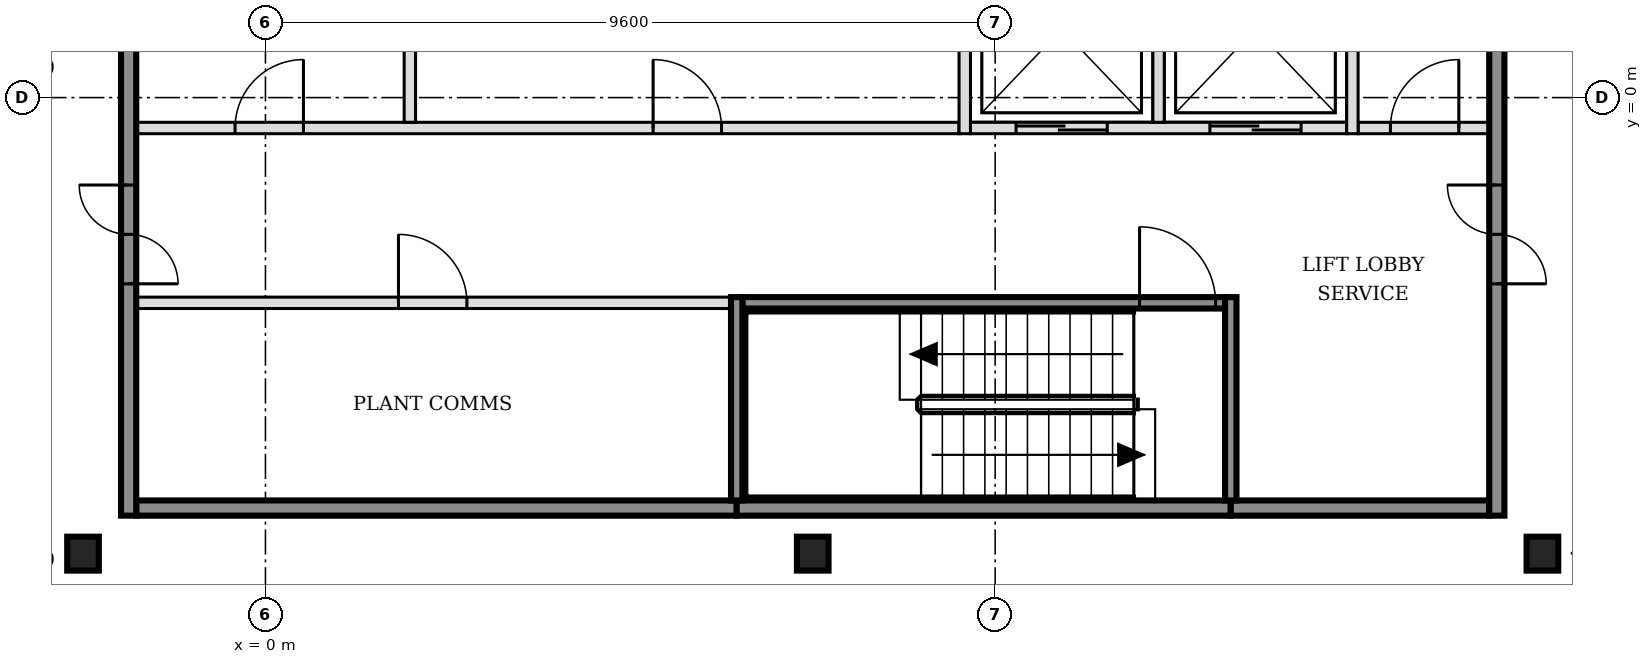
"""IFC4 building model, lengths in metres.
Left out: names, types, materials, properties, quantities, classifications, styles, units other than length and angle.
Written with IfcOpenShell. Run it as: python <this file> out.ifc"""

import sys

from ifc_helpers import new_model, si_unit, direction, frame, frame_2d, origin, origin_2d, place, context, subcontext, project, spatial, rectangle, i_section, extrude, element, fill, save


model = new_model("IFC4")
c1 = context("Model", 3, precision=1e-05, world=origin(), true_north=direction((0.0, 1.0)))
c2 = subcontext(c1, "Body", "Model", "MODEL_VIEW")
j1 = project(units=[si_unit("LENGTHUNIT", "METRE"), si_unit("PLANEANGLEUNIT", "RADIAN")], contexts=[c1])
p1 = place(None, origin())
s1 = spatial("IfcSite", under=j1, at=p1, CompositionType="ELEMENT")
p2 = place(p1, origin())
s2 = spatial("IfcBuilding", under=s1, at=p2, CompositionType="ELEMENT")
p3 = place(p2, frame((0.0, 0.0, 168.6)))
s3 = spatial("IfcBuildingStorey", under=s2, at=p3, CompositionType="ELEMENT", Elevation=168.6)
for number, where, z_axis, x_axis in (
    (1, (-2.4, -6.0, -0.15), (0.0, 0.0, 1.0), (1.0, 0.0, 0.0)),
    (2, (7.2, -6.0, -0.15), (0.0, 0.0, 1.0), (1.0, 0.0, 0.0)),
    (3, (16.8, -6.0, -0.15), (0.0, 0.0, 1.0), (1.0, 0.0, 0.0)),
):
    element("IfcColumn", number, at=place(p3, frame(where, z_axis=z_axis, x_axis=x_axis)), inside=s3, PredefinedType="COLUMN", context=c2, shape_type="SweptSolid", body=[
        extrude(i_section(OverallWidth=0.416, OverallDepth=0.446, WebThickness=0.039, FlangeThickness=0.063, FilletRadius=0.015, at=origin_2d()), origin(), (0.0, 0.0, 1.0), 3.6),
    ])
p4 = place(p3, frame((-1.7, -5.4, 0.0), z_axis=(0.0, 0.0, 1.0), x_axis=(1.0, 0.0, 0.0)))
e4 = element("IfcWall", 4, at=p4, inside=s3, PredefinedType="SOLIDWALL", context=c2, shape_type="SweptSolid", body=[
    extrude(rectangle(XDim=7.9, YDim=0.2, at=frame_2d((3.95, 0.0))), origin(), (0.0, 0.0, 1.0), 3.45),
])
p5 = place(p3, frame((6.2, -5.4, 0.0), z_axis=(0.0, 0.0, 1.0), x_axis=(1.0, 0.0, 0.0)))
e5 = element("IfcWall", 5, at=p5, inside=s3, PredefinedType="SOLIDWALL", context=c2, shape_type="SweptSolid", body=[
    extrude(rectangle(XDim=6.5, YDim=0.2, at=frame_2d((3.25, 0.0))), origin(), (0.0, 0.0, 1.0), 3.45),
])
p6 = place(p3, frame((12.7, -5.4, 0.0), z_axis=(0.0, 0.0, 1.0), x_axis=(1.0, 0.0, 0.0)))
e6 = element("IfcWall", 6, at=p6, inside=s3, PredefinedType="SOLIDWALL", context=c2, shape_type="SweptSolid", body=[
    extrude(rectangle(XDim=3.4, YDim=0.2, at=frame_2d((1.7, 0.0))), origin(), (0.0, 0.0, 1.0), 3.45),
])
p7 = place(p3, frame((-1.7, -2.7, 0.0), z_axis=(0.0, 0.0, 1.0), x_axis=(1.0, 0.0, 0.0)))
e7 = element("IfcWall", 7, at=p7, inside=s3, PredefinedType="PARTITIONING", context=c2, shape_type="SweptSolid", body=[
    extrude(rectangle(XDim=7.825, YDim=0.15, at=frame_2d((3.913, 0.0))), origin(), (0.0, 0.0, 1.0), 3.45),
])
p8 = place(p7, frame((3.45, 0.0, 0.0)))
e8 = element("IfcOpeningElement", 8, at=p8, cuts=e7, PredefinedType="OPENING", context=c2, shape_type="SweptSolid", body=[
    extrude(rectangle(XDim=0.9, YDim=2.1, at=frame_2d((0.45, 1.05))), frame((0.0, 0.085, 0.0), z_axis=(0.0, -1.0, 0.0), x_axis=(1.0, 0.0, 0.0)), (0.0, 0.0, 1.0), 0.17),
])
p9 = place(p3, frame((6.275, -2.7, 0.0), z_axis=(0.0, 0.0, 1.0), x_axis=(1.0, 0.0, 0.0)))
e9 = element("IfcWall", 9, at=p9, inside=s3, PredefinedType="SOLIDWALL", context=c2, shape_type="SweptSolid", body=[
    extrude(rectangle(XDim=6.35, YDim=0.15, at=frame_2d((3.175, 0.0))), origin(), (0.0, 0.0, 1.0), 3.45),
])
p10 = place(p9, frame((5.225, 0.0, 0.0)))
e10 = element("IfcOpeningElement", 10, at=p10, cuts=e9, PredefinedType="OPENING", context=c2, shape_type="SweptSolid", body=[
    extrude(rectangle(XDim=1.0, YDim=2.1, at=frame_2d((0.5, 1.05))), frame((0.0, 0.085, 0.0), z_axis=(0.0, -1.0, 0.0), x_axis=(1.0, 0.0, 0.0)), (0.0, 0.0, 1.0), 0.17),
])
p11 = place(p3, frame((-1.7, -0.4, 0.0), z_axis=(0.0, 0.0, 1.0), x_axis=(1.0, 0.0, 0.0)))
e11 = element("IfcWall", 11, at=p11, inside=s3, PredefinedType="PARTITIONING", context=c2, shape_type="SweptSolid", body=[
    extrude(rectangle(XDim=10.825, YDim=0.15, at=frame_2d((5.413, 0.0))), origin(), (0.0, 0.0, 1.0), 3.45),
])
p12 = place(p11, frame((1.3, 0.0, 0.0)))
e12 = element("IfcOpeningElement", 12, at=p12, cuts=e11, PredefinedType="OPENING", context=c2, shape_type="SweptSolid", body=[
    extrude(rectangle(XDim=0.9, YDim=2.1, at=frame_2d((0.45, 1.05))), frame((0.0, 0.085, 0.0), z_axis=(0.0, -1.0, 0.0), x_axis=(1.0, 0.0, 0.0)), (0.0, 0.0, 1.0), 0.17),
])
p13 = place(p11, frame((6.8, 0.0, 0.0)))
e13 = element("IfcOpeningElement", 13, at=p13, cuts=e11, PredefinedType="OPENING", context=c2, shape_type="SweptSolid", body=[
    extrude(rectangle(XDim=0.9, YDim=2.1, at=frame_2d((0.45, 1.05))), frame((0.0, 0.085, 0.0), z_axis=(0.0, -1.0, 0.0), x_axis=(1.0, 0.0, 0.0)), (0.0, 0.0, 1.0), 0.17),
])
p14 = place(p3, frame((9.275, -0.4, 0.0), z_axis=(0.0, 0.0, 1.0), x_axis=(1.0, 0.0, 0.0)))
e14 = element("IfcWall", 14, at=p14, inside=s3, PredefinedType="SOLIDWALL", context=c2, shape_type="SweptSolid", body=[
    extrude(rectangle(XDim=4.95, YDim=0.15, at=frame_2d((2.475, 0.0))), origin(), (0.0, 0.0, 1.0), 3.45),
])
p15 = place(p14, frame((0.6, 0.0, 0.0)))
e15 = element("IfcOpeningElement", 15, at=p15, cuts=e14, PredefinedType="OPENING", context=c2, shape_type="SweptSolid", body=[
    extrude(rectangle(XDim=1.2, YDim=2.1, at=frame_2d((0.6, 1.05))), frame((0.0, 0.085, 0.0), z_axis=(0.0, -1.0, 0.0), x_axis=(1.0, 0.0, 0.0)), (0.0, 0.0, 1.0), 0.17),
])
p16 = place(p14, frame((3.15, 0.0, 0.0)))
e16 = element("IfcOpeningElement", 16, at=p16, cuts=e14, PredefinedType="OPENING", context=c2, shape_type="SweptSolid", body=[
    extrude(rectangle(XDim=1.2, YDim=2.1, at=frame_2d((0.6, 1.05))), frame((0.0, 0.085, 0.0), z_axis=(0.0, -1.0, 0.0), x_axis=(1.0, 0.0, 0.0)), (0.0, 0.0, 1.0), 0.17),
])
p17 = place(p3, frame((14.375, -0.4, 0.0), z_axis=(0.0, 0.0, 1.0), x_axis=(1.0, 0.0, 0.0)))
e17 = element("IfcWall", 17, at=p17, inside=s3, PredefinedType="PARTITIONING", context=c2, shape_type="SweptSolid", body=[
    extrude(rectangle(XDim=1.725, YDim=0.15, at=frame_2d((0.863, 0.0))), origin(), (0.0, 0.0, 1.0), 3.45),
])
p18 = place(p17, frame((0.425, 0.0, 0.0)))
e18 = element("IfcOpeningElement", 18, at=p18, cuts=e17, PredefinedType="OPENING", context=c2, shape_type="SweptSolid", body=[
    extrude(rectangle(XDim=0.9, YDim=2.1, at=frame_2d((0.45, 1.05))), frame((0.0, 0.085, 0.0), z_axis=(0.0, -1.0, 0.0), x_axis=(1.0, 0.0, 0.0)), (0.0, 0.0, 1.0), 0.17),
])
p19 = place(p3, frame((-1.8, -5.5, 0.0), z_axis=(0.0, 0.0, 1.0), x_axis=(0.0, 1.0, 0.0)))
e19 = element("IfcWall", 19, at=p19, inside=s3, PredefinedType="SOLIDWALL", context=c2, shape_type="SweptSolid", body=[
    extrude(rectangle(XDim=15.8, YDim=0.2, at=frame_2d((7.9, 0.0))), origin(), (0.0, 0.0, 1.0), 3.45),
])
p20 = place(p19, frame((3.05, 0.0, 0.0)))
e20 = element("IfcOpeningElement", 20, at=p20, cuts=e19, PredefinedType="OPENING", context=c2, shape_type="SweptSolid", body=[
    extrude(rectangle(XDim=1.3, YDim=2.1, at=frame_2d((0.65, 1.05))), frame((0.0, 0.11, 0.0), z_axis=(0.0, -1.0, 0.0), x_axis=(1.0, 0.0, 0.0)), (0.0, 0.0, 1.0), 0.22),
])
p21 = place(p19, frame((11.45, 0.0, 0.0)))
e21 = element("IfcOpeningElement", 21, at=p21, cuts=e19, PredefinedType="OPENING", context=c2, shape_type="SweptSolid", body=[
    extrude(rectangle(XDim=1.3, YDim=2.1, at=frame_2d((0.65, 1.05))), frame((0.0, 0.11, 0.0), z_axis=(0.0, -1.0, 0.0), x_axis=(1.0, 0.0, 0.0)), (0.0, 0.0, 1.0), 0.22),
])
p22 = place(p3, frame((1.9, -0.325, 0.0), z_axis=(0.0, 0.0, 1.0), x_axis=(0.0, 1.0, 0.0)))
e22 = element("IfcWall", 22, at=p22, inside=s3, PredefinedType="PARTITIONING", context=c2, shape_type="SweptSolid", body=[
    extrude(rectangle(XDim=2.45, YDim=0.15, at=frame_2d((1.225, 0.0))), origin(), (0.0, 0.0, 1.0), 3.45),
])
p23 = place(p3, frame((6.2, -5.3, 0.0), z_axis=(0.0, 0.0, 1.0), x_axis=(0.0, 1.0, 0.0)))
e23 = element("IfcWall", 23, at=p23, inside=s3, PredefinedType="SOLIDWALL", context=c2, shape_type="SweptSolid", body=[
    extrude(rectangle(XDim=2.675, YDim=0.15, at=frame_2d((1.337, 0.0))), origin(), (0.0, 0.0, 1.0), 3.45),
])
p24 = place(p3, frame((9.2, -0.475, 0.0), z_axis=(0.0, 0.0, 1.0), x_axis=(0.0, 1.0, 0.0)))
e24 = element("IfcWall", 24, at=p24, inside=s3, PredefinedType="SOLIDWALL", context=c2, shape_type="SweptSolid", body=[
    extrude(rectangle(XDim=2.6, YDim=0.15, at=frame_2d((1.3, 0.0))), origin(), (0.0, 0.0, 1.0), 3.45),
])
p25 = place(p3, frame((11.75, -0.325, 0.0), z_axis=(0.0, 0.0, 1.0), x_axis=(0.0, 1.0, 0.0)))
e25 = element("IfcWall", 25, at=p25, inside=s3, PredefinedType="SOLIDWALL", context=c2, shape_type="SweptSolid", body=[
    extrude(rectangle(XDim=2.45, YDim=0.15, at=frame_2d((1.225, 0.0))), origin(), (0.0, 0.0, 1.0), 3.45),
])
p26 = place(p3, frame((12.7, -5.3, 0.0), z_axis=(0.0, 0.0, 1.0), x_axis=(0.0, 1.0, 0.0)))
e26 = element("IfcWall", 26, at=p26, inside=s3, PredefinedType="SOLIDWALL", context=c2, shape_type="SweptSolid", body=[
    extrude(rectangle(XDim=2.675, YDim=0.15, at=frame_2d((1.337, 0.0))), origin(), (0.0, 0.0, 1.0), 3.45),
])
p27 = place(p3, frame((14.3, -0.475, 0.0), z_axis=(0.0, 0.0, 1.0), x_axis=(0.0, 1.0, 0.0)))
e27 = element("IfcWall", 27, at=p27, inside=s3, PredefinedType="SOLIDWALL", context=c2, shape_type="SweptSolid", body=[
    extrude(rectangle(XDim=2.75, YDim=0.15, at=frame_2d((1.375, 0.0))), origin(), (0.0, 0.0, 1.0), 3.45),
])
p28 = place(p3, frame((16.2, -5.5, 0.0), z_axis=(0.0, 0.0, 1.0), x_axis=(0.0, 1.0, 0.0)))
e28 = element("IfcWall", 28, at=p28, inside=s3, PredefinedType="SOLIDWALL", context=c2, shape_type="SweptSolid", body=[
    extrude(rectangle(XDim=15.8, YDim=0.2, at=frame_2d((7.9, 0.0))), origin(), (0.0, 0.0, 1.0), 3.45),
])
p29 = place(p28, frame((3.05, 0.0, 0.0)))
e29 = element("IfcOpeningElement", 29, at=p29, cuts=e28, PredefinedType="OPENING", context=c2, shape_type="SweptSolid", body=[
    extrude(rectangle(XDim=1.3, YDim=2.1, at=frame_2d((0.65, 1.05))), frame((0.0, 0.11, 0.0), z_axis=(0.0, -1.0, 0.0), x_axis=(1.0, 0.0, 0.0)), (0.0, 0.0, 1.0), 0.22),
])
p30 = place(p28, frame((11.45, 0.0, 0.0)))
e30 = element("IfcOpeningElement", 30, at=p30, cuts=e28, PredefinedType="OPENING", context=c2, shape_type="SweptSolid", body=[
    extrude(rectangle(XDim=1.3, YDim=2.1, at=frame_2d((0.65, 1.05))), frame((0.0, 0.11, 0.0), z_axis=(0.0, -1.0, 0.0), x_axis=(1.0, 0.0, 0.0)), (0.0, 0.0, 1.0), 0.22),
])
p31 = place(p15, origin())
e31 = element("IfcDoor", 31, at=p31, inside=s3, OperationType="DOUBLE_DOOR_SLIDING", PredefinedType="DOOR", context=c2, shape_type="SweptSolid", body=[
    extrude(rectangle(XDim=1.2, YDim=2.1, at=frame_2d((0.6, 1.05))), frame((0.0, 0.025, 0.0), z_axis=(0.0, -1.0, 0.0), x_axis=(1.0, 0.0, 0.0)), (0.0, 0.0, 1.0), 0.05),
])
fill(e15, e31)
p32 = place(p16, origin())
e32 = element("IfcDoor", 32, at=p32, inside=s3, OperationType="DOUBLE_DOOR_SLIDING", PredefinedType="DOOR", context=c2, shape_type="SweptSolid", body=[
    extrude(rectangle(XDim=1.2, YDim=2.1, at=frame_2d((0.6, 1.05))), frame((0.0, 0.025, 0.0), z_axis=(0.0, -1.0, 0.0), x_axis=(1.0, 0.0, 0.0)), (0.0, 0.0, 1.0), 0.05),
])
fill(e16, e32)
p33 = place(p10, origin())
e33 = element("IfcDoor", 33, at=p33, inside=s3, OperationType="SINGLE_SWING_LEFT", PredefinedType="DOOR", context=c2, shape_type="SweptSolid", body=[
    extrude(rectangle(XDim=1.0, YDim=2.1, at=frame_2d((0.5, 1.05))), frame((0.0, 0.025, 0.0), z_axis=(0.0, -1.0, 0.0), x_axis=(1.0, 0.0, 0.0)), (0.0, 0.0, 1.0), 0.05),
])
fill(e10, e33)
p34 = place(p20, origin())
e34 = element("IfcDoor", 34, at=p34, inside=s3, OperationType="DOUBLE_DOOR_SINGLE_SWING", PredefinedType="DOOR", context=c2, shape_type="SweptSolid", body=[
    extrude(rectangle(XDim=1.3, YDim=2.1, at=frame_2d((0.65, 1.05))), frame((0.0, 0.025, 0.0), z_axis=(0.0, -1.0, 0.0), x_axis=(1.0, 0.0, 0.0)), (0.0, 0.0, 1.0), 0.05),
])
fill(e20, e34)
p35 = place(p29, origin())
e35 = element("IfcDoor", 35, at=p35, inside=s3, OperationType="DOUBLE_DOOR_SINGLE_SWING", PredefinedType="DOOR", context=c2, shape_type="SweptSolid", body=[
    extrude(rectangle(XDim=1.3, YDim=2.1, at=frame_2d((0.65, 1.05))), frame((0.0, 0.025, 0.0), z_axis=(0.0, -1.0, 0.0), x_axis=(1.0, 0.0, 0.0)), (0.0, 0.0, 1.0), 0.05),
])
fill(e29, e35)
p36 = place(p18, origin())
e36 = element("IfcDoor", 36, at=p36, inside=s3, OperationType="SINGLE_SWING_RIGHT", PredefinedType="DOOR", context=c2, shape_type="SweptSolid", body=[
    extrude(rectangle(XDim=0.9, YDim=2.1, at=frame_2d((0.45, 1.05))), frame((0.0, 0.025, 0.0), z_axis=(0.0, -1.0, 0.0), x_axis=(1.0, 0.0, 0.0)), (0.0, 0.0, 1.0), 0.05),
])
fill(e18, e36)
p37 = place(p8, origin())
e37 = element("IfcDoor", 37, at=p37, inside=s3, OperationType="SINGLE_SWING_LEFT", PredefinedType="DOOR", context=c2, shape_type="SweptSolid", body=[
    extrude(rectangle(XDim=0.9, YDim=2.1, at=frame_2d((0.45, 1.05))), frame((0.0, 0.025, 0.0), z_axis=(0.0, -1.0, 0.0), x_axis=(1.0, 0.0, 0.0)), (0.0, 0.0, 1.0), 0.05),
])
fill(e8, e37)
p38 = place(p12, origin())
e38 = element("IfcDoor", 38, at=p38, inside=s3, OperationType="SINGLE_SWING_RIGHT", PredefinedType="DOOR", context=c2, shape_type="SweptSolid", body=[
    extrude(rectangle(XDim=0.9, YDim=2.1, at=frame_2d((0.45, 1.05))), frame((0.0, 0.025, 0.0), z_axis=(0.0, -1.0, 0.0), x_axis=(1.0, 0.0, 0.0)), (0.0, 0.0, 1.0), 0.05),
])
fill(e12, e38)
p39 = place(p13, origin())
e39 = element("IfcDoor", 39, at=p39, inside=s3, OperationType="SINGLE_SWING_LEFT", PredefinedType="DOOR", context=c2, shape_type="SweptSolid", body=[
    extrude(rectangle(XDim=0.9, YDim=2.1, at=frame_2d((0.45, 1.05))), frame((0.0, 0.025, 0.0), z_axis=(0.0, -1.0, 0.0), x_axis=(1.0, 0.0, 0.0)), (0.0, 0.0, 1.0), 0.05),
])
fill(e13, e39)
save(model, sys.argv[1])
